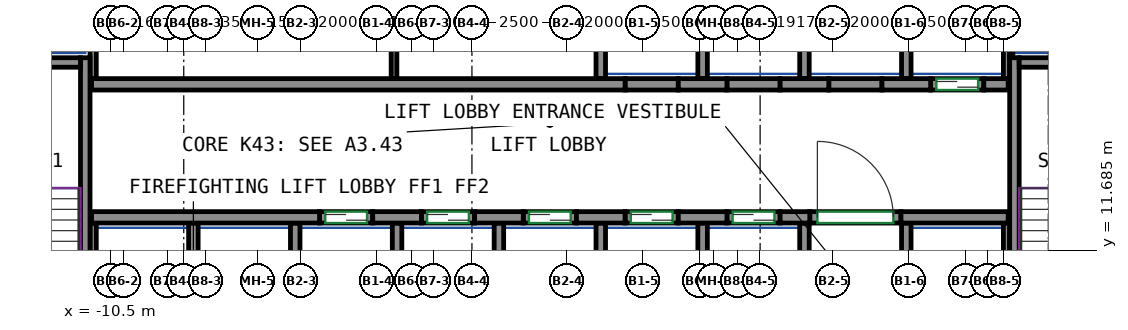
"""IFC4 building model, lengths in metres.
Left out: names, types, materials, properties, quantities, classifications, styles, units other than length and angle.
Written with IfcOpenShell. Run it as: python <this file> out.ifc"""

import sys

from ifc_helpers import new_model, si_unit, direction, frame, frame_2d, origin, place, context, subcontext, project, spatial, rectangle, extrude, source, transform, mapped, element, fill, save


model = new_model("IFC4")
c1 = context("Model", 3, precision=1e-05, world=origin(), true_north=direction((0.0, 1.0)))
c2 = subcontext(c1, "Body", "Model", "MODEL_VIEW")
j1 = project(units=[si_unit("LENGTHUNIT", "METRE"), si_unit("PLANEANGLEUNIT", "RADIAN")], contexts=[c1])
p1 = place(None, origin())
s1 = spatial("IfcSite", under=j1, at=p1, CompositionType="ELEMENT")
p2 = place(p1, origin())
s2 = spatial("IfcBuilding", under=s1, at=p2, CompositionType="ELEMENT")
p3 = place(p2, frame((0.0, 0.0, 178.7)))
s3 = spatial("IfcBuildingStorey", under=s2, at=p3, CompositionType="ELEMENT", Elevation=178.7)
m1 = source(origin(), c2, "Body", "SweptSolid", [
    extrude(rectangle(XDim=7.75, YDim=0.25, at=frame_2d((3.875, 0.0))), origin(), (0.0, 0.0, 1.0), 3.12),
])
p4 = place(p3, frame((-11.175, 9.0, 0.0), z_axis=(0.0, 0.0, 1.0), x_axis=(0.0, 1.0, 0.0)))
e1 = element("IfcWall", 1, at=p4, inside=s3, PredefinedType="SHEAR", context=c2, shape_type="MappedRepresentation", body=[
    mapped(m1, transform((0.0, 0.0, 0.0))),
])
m2 = source(origin(), c2, "Body", "SweptSolid", [
    extrude(rectangle(XDim=3.7, YDim=0.25, at=frame_2d((1.85, 0.0))), origin(), (0.0, 0.0, 1.0), 3.12),
])
p5 = place(p3, frame((-15.0, 16.625, 0.0), z_axis=(0.0, 0.0, 1.0), x_axis=(1.0, 0.0, 0.0)))
e2 = element("IfcWall", 2, at=p5, inside=s3, PredefinedType="SHEAR", context=c2, shape_type="MappedRepresentation", body=[
    mapped(m2, transform((0.0, 0.0, 0.0))),
])
p6 = place(p3, frame((13.275, 9.0, 0.0), z_axis=(0.0, 0.0, 1.0), x_axis=(0.0, 1.0, 0.0)))
e3 = element("IfcWall", 3, at=p6, inside=s3, PredefinedType="SHEAR", context=c2, shape_type="MappedRepresentation", body=[
    mapped(m1, transform((0.0, 0.0, 0.0))),
])
m3 = source(origin(), c2, "Body", "SweptSolid", [
    extrude(rectangle(XDim=3.7, YDim=0.25, at=frame_2d((1.85, 0.0))), origin(), (0.0, 0.0, 1.0), 3.12),
])
p7 = place(p3, frame((13.4, 16.625, 0.0), z_axis=(0.0, 0.0, 1.0), x_axis=(1.0, 0.0, 0.0)))
e4 = element("IfcWall", 4, at=p7, inside=s3, PredefinedType="SHEAR", context=c2, shape_type="MappedRepresentation", body=[
    mapped(m3, transform((0.0, 0.0, 0.0))),
])
m4 = source(origin(), c2, "Body", "SweptSolid", [
    extrude(rectangle(XDim=6.0, YDim=0.3, at=frame_2d((3.0, 0.0))), origin(), (0.0, 0.0, 1.0), 3.12),
])
p8 = place(p3, frame((-11.01, 12.55, 0.0), z_axis=(0.0, 0.0, 1.0), x_axis=(1.0, 0.0, 0.0)))
e5 = element("IfcWall", 5, at=p8, inside=s3, PredefinedType="SHEAR", context=c2, shape_type="MappedRepresentation", body=[
    mapped(m4, transform((0.0, 0.0, 0.0))),
])
m5 = source(origin(), c2, "Body", "SweptSolid", [
    extrude(rectangle(XDim=1.28, YDim=0.3, at=frame_2d((0.64, 0.0))), origin(), (0.0, 0.0, 1.0), 3.12),
])
for number, where, z_axis, x_axis in (
    (6, (-3.61, 12.55, 0.0), (0.0, 0.0, 1.0), (1.0, 0.0, 0.0)),
    (7, (-0.93, 12.55, 0.0), (0.0, 0.0, 1.0), (1.0, 0.0, 0.0)),
    (8, (1.75, 12.55, 0.0), (0.0, 0.0, 1.0), (1.0, 0.0, 0.0)),
    (9, (4.43, 12.55, 0.0), (0.0, 0.0, 1.0), (1.0, 0.0, 0.0)),
):
    element("IfcWall", number, at=place(p3, frame(where, z_axis=z_axis, x_axis=x_axis)), inside=s3, PredefinedType="SHEAR", context=c2, shape_type="MappedRepresentation", body=[
        mapped(m5, transform((0.0, 0.0, 0.0))),
    ])
m6 = source(origin(), c2, "Body", "SweptSolid", [
    extrude(rectangle(XDim=0.78, YDim=0.3, at=frame_2d((0.39, 0.0))), origin(), (0.0, 0.0, 1.0), 3.12),
])
p9 = place(p3, frame((7.11, 12.55, 0.0), z_axis=(0.0, 0.0, 1.0), x_axis=(1.0, 0.0, 0.0)))
e10 = element("IfcWall", 10, at=p9, inside=s3, PredefinedType="SHEAR", context=c2, shape_type="MappedRepresentation", body=[
    mapped(m6, transform((0.0, 0.0, 0.0))),
])
m7 = source(origin(), c2, "Body", "SweptSolid", [
    extrude(rectangle(XDim=2.82, YDim=0.3, at=frame_2d((1.41, 0.0))), origin(), (0.0, 0.0, 1.0), 3.12),
])
p10 = place(p3, frame((10.29, 12.55, 0.0), z_axis=(0.0, 0.0, 1.0), x_axis=(1.0, 0.0, 0.0)))
e11 = element("IfcWall", 11, at=p10, inside=s3, PredefinedType="SHEAR", context=c2, shape_type="MappedRepresentation", body=[
    mapped(m7, transform((0.0, 0.0, 0.0))),
])
m8 = source(origin(), c2, "Body", "SweptSolid", [
    extrude(rectangle(XDim=14.04, YDim=0.3, at=frame_2d((7.02, 0.0))), origin(), (0.0, 0.0, 1.0), 3.12),
])
p11 = place(p3, frame((-11.01, 16.05, 0.0), z_axis=(0.0, 0.0, 1.0), x_axis=(1.0, 0.0, 0.0)))
e12 = element("IfcWall", 12, at=p11, inside=s3, PredefinedType="SHEAR", context=c2, shape_type="MappedRepresentation", body=[
    mapped(m8, transform((0.0, 0.0, 0.0))),
])
p12 = place(p3, frame((4.43, 16.05, 0.0), z_axis=(0.0, 0.0, 1.0), x_axis=(1.0, 0.0, 0.0)))
e13 = element("IfcWall", 13, at=p12, inside=s3, PredefinedType="SHEAR", context=c2, shape_type="MappedRepresentation", body=[
    mapped(m5, transform((0.0, 0.0, 0.0))),
])
m9 = source(origin(), c2, "Body", "SweptSolid", [
    extrude(rectangle(XDim=1.28, YDim=0.3, at=frame_2d((0.64, 0.0))), origin(), (0.0, 0.0, 1.0), 3.12),
])
p13 = place(p3, frame((7.11, 16.05, 0.0), z_axis=(0.0, 0.0, 1.0), x_axis=(1.0, 0.0, 0.0)))
e14 = element("IfcWall", 14, at=p13, inside=s3, PredefinedType="SHEAR", context=c2, shape_type="MappedRepresentation", body=[
    mapped(m9, transform((0.0, 0.0, 0.0))),
])
p14 = place(p3, frame((9.79, 16.05, 0.0), z_axis=(0.0, 0.0, 1.0), x_axis=(1.0, 0.0, 0.0)))
e15 = element("IfcWall", 15, at=p14, inside=s3, PredefinedType="SHEAR", context=c2, shape_type="MappedRepresentation", body=[
    mapped(m5, transform((0.0, 0.0, 0.0))),
])
m10 = source(origin(), c2, "Body", "SweptSolid", [
    extrude(rectangle(XDim=0.64, YDim=0.3, at=frame_2d((0.32, 0.0))), origin(), (0.0, 0.0, 1.0), 3.12),
])
p15 = place(p3, frame((12.47, 16.05, 0.0), z_axis=(0.0, 0.0, 1.0), x_axis=(1.0, 0.0, 0.0)))
e16 = element("IfcWall", 16, at=p15, inside=s3, PredefinedType="SHEAR", context=c2, shape_type="MappedRepresentation", body=[
    mapped(m10, transform((0.0, 0.0, 0.0))),
])
m11 = source(origin(), c2, "Body", "SweptSolid", [
    extrude(rectangle(XDim=1.4, YDim=0.3, at=frame_2d((0.7, 0.0))), origin(), (0.0, 0.0, 1.0), 3.12),
])
p16 = place(p3, frame((-5.01, 12.55, 0.0), z_axis=(0.0, 0.0, 1.0), x_axis=(1.0, 0.0, 0.0)))
e17 = element("IfcWall", 17, at=p16, inside=s3, PredefinedType="PARTITIONING", context=c2, shape_type="MappedRepresentation", body=[
    mapped(m11, transform((0.0, 0.0, 0.0))),
])
p17 = place(p16, frame((0.15, 0.0, 0.0)))
e18 = element("IfcOpeningElement", 18, at=p17, cuts=e17, PredefinedType="OPENING", context=c2, shape_type="SweptSolid", body=[
    extrude(rectangle(XDim=1.1, YDim=2.1, at=frame_2d((0.55, 1.05))), frame((0.0, 0.16, 0.0), z_axis=(0.0, -1.0, 0.0), x_axis=(1.0, 0.0, 0.0)), (0.0, 0.0, 1.0), 0.32),
])
m12 = source(origin(), c2, "Body", "SweptSolid", [
    extrude(rectangle(XDim=1.4, YDim=0.3, at=frame_2d((0.7, 0.0))), origin(), (0.0, 0.0, 1.0), 3.12),
])
p18 = place(p3, frame((-2.33, 12.55, 0.0), z_axis=(0.0, 0.0, 1.0), x_axis=(1.0, 0.0, 0.0)))
e19 = element("IfcWall", 19, at=p18, inside=s3, PredefinedType="PARTITIONING", context=c2, shape_type="MappedRepresentation", body=[
    mapped(m12, transform((0.0, 0.0, 0.0))),
])
p19 = place(p18, frame((0.15, 0.0, 0.0)))
e20 = element("IfcOpeningElement", 20, at=p19, cuts=e19, PredefinedType="OPENING", context=c2, shape_type="SweptSolid", body=[
    extrude(rectangle(XDim=1.1, YDim=2.1, at=frame_2d((0.55, 1.05))), frame((0.0, 0.16, 0.0), z_axis=(0.0, -1.0, 0.0), x_axis=(1.0, 0.0, 0.0)), (0.0, 0.0, 1.0), 0.32),
])
p20 = place(p3, frame((0.35, 12.55, 0.0), z_axis=(0.0, 0.0, 1.0), x_axis=(1.0, 0.0, 0.0)))
e21 = element("IfcWall", 21, at=p20, inside=s3, PredefinedType="PARTITIONING", context=c2, shape_type="MappedRepresentation", body=[
    mapped(m11, transform((0.0, 0.0, 0.0))),
])
p21 = place(p20, frame((0.15, 0.0, 0.0)))
e22 = element("IfcOpeningElement", 22, at=p21, cuts=e21, PredefinedType="OPENING", context=c2, shape_type="SweptSolid", body=[
    extrude(rectangle(XDim=1.1, YDim=2.1, at=frame_2d((0.55, 1.05))), frame((0.0, 0.16, 0.0), z_axis=(0.0, -1.0, 0.0), x_axis=(1.0, 0.0, 0.0)), (0.0, 0.0, 1.0), 0.32),
])
p22 = place(p3, frame((3.03, 12.55, 0.0), z_axis=(0.0, 0.0, 1.0), x_axis=(1.0, 0.0, 0.0)))
e23 = element("IfcWall", 23, at=p22, inside=s3, PredefinedType="PARTITIONING", context=c2, shape_type="MappedRepresentation", body=[
    mapped(m11, transform((0.0, 0.0, 0.0))),
])
p23 = place(p22, frame((0.15, 0.0, 0.0)))
e24 = element("IfcOpeningElement", 24, at=p23, cuts=e23, PredefinedType="OPENING", context=c2, shape_type="SweptSolid", body=[
    extrude(rectangle(XDim=1.1, YDim=2.1, at=frame_2d((0.55, 1.05))), frame((0.0, 0.16, 0.0), z_axis=(0.0, -1.0, 0.0), x_axis=(1.0, 0.0, 0.0)), (0.0, 0.0, 1.0), 0.32),
])
p24 = place(p3, frame((5.71, 12.55, 0.0), z_axis=(0.0, 0.0, 1.0), x_axis=(1.0, 0.0, 0.0)))
e25 = element("IfcWall", 25, at=p24, inside=s3, PredefinedType="PARTITIONING", context=c2, shape_type="MappedRepresentation", body=[
    mapped(m12, transform((0.0, 0.0, 0.0))),
])
p25 = place(p24, frame((0.15, 0.0, 0.0)))
e26 = element("IfcOpeningElement", 26, at=p25, cuts=e25, PredefinedType="OPENING", context=c2, shape_type="SweptSolid", body=[
    extrude(rectangle(XDim=1.1, YDim=2.1, at=frame_2d((0.55, 1.05))), frame((0.0, 0.16, 0.0), z_axis=(0.0, -1.0, 0.0), x_axis=(1.0, 0.0, 0.0)), (0.0, 0.0, 1.0), 0.32),
])
p26 = place(p3, frame((11.07, 16.05, 0.0), z_axis=(0.0, 0.0, 1.0), x_axis=(1.0, 0.0, 0.0)))
e27 = element("IfcWall", 27, at=p26, inside=s3, PredefinedType="PARTITIONING", context=c2, shape_type="MappedRepresentation", body=[
    mapped(m11, transform((0.0, 0.0, 0.0))),
])
p27 = place(p26, frame((0.15, 0.0, 0.0)))
e28 = element("IfcOpeningElement", 28, at=p27, cuts=e27, PredefinedType="OPENING", context=c2, shape_type="SweptSolid", body=[
    extrude(rectangle(XDim=1.1, YDim=2.1, at=frame_2d((0.55, 1.05))), frame((0.0, 0.16, 0.0), z_axis=(0.0, -1.0, 0.0), x_axis=(1.0, 0.0, 0.0)), (0.0, 0.0, 1.0), 0.32),
])
m13 = source(origin(), c2, "Body", "SweptSolid", [
    extrude(rectangle(XDim=2.4, YDim=0.3, at=frame_2d((1.2, 0.0))), origin(), (0.0, 0.0, 1.0), 3.12),
])
p28 = place(p3, frame((7.89, 12.55, 0.0), z_axis=(0.0, 0.0, 1.0), x_axis=(1.0, 0.0, 0.0)))
e29 = element("IfcWall", 29, at=p28, inside=s3, PredefinedType="PARTITIONING", context=c2, shape_type="MappedRepresentation", body=[
    mapped(m13, transform((0.0, 0.0, 0.0))),
])
p29 = place(p28, frame((0.2, 0.0, 0.0)))
e30 = element("IfcOpeningElement", 30, at=p29, cuts=e29, PredefinedType="OPENING", context=c2, shape_type="SweptSolid", body=[
    extrude(rectangle(XDim=2.0, YDim=2.1, at=frame_2d((1.0, 1.05))), frame((0.0, 0.16, 0.0), z_axis=(0.0, -1.0, 0.0), x_axis=(1.0, 0.0, 0.0)), (0.0, 0.0, 1.0), 0.32),
])
p30 = place(p3, frame((3.03, 16.05, 0.0), z_axis=(0.0, 0.0, 1.0), x_axis=(1.0, 0.0, 0.0)))
e31 = element("IfcWall", 31, at=p30, inside=s3, PredefinedType="PARTITIONING", context=c2, shape_type="MappedRepresentation", body=[
    mapped(m11, transform((0.0, 0.0, 0.0))),
])
for number, where, z_axis, x_axis in (
    (32, (5.71, 16.05, 0.0), (0.0, 0.0, 1.0), (1.0, 0.0, 0.0)),
    (33, (8.39, 16.05, 0.0), (0.0, 0.0, 1.0), (1.0, 0.0, 0.0)),
):
    element("IfcWall", number, at=place(p3, frame(where, z_axis=z_axis, x_axis=x_axis)), inside=s3, PredefinedType="PARTITIONING", context=c2, shape_type="MappedRepresentation", body=[
        mapped(m12, transform((0.0, 0.0, 0.0))),
    ])
m14 = source(origin(), c2, "Body", "SweptSolid", [
    extrude(rectangle(XDim=3.275, YDim=0.165, at=frame_2d((1.638, 0.0))), origin(), (0.0, 0.0, 1.0), 3.12),
])
p31 = place(p3, frame((13.067, 16.2, 0.0), z_axis=(0.0, 0.0, 1.0), x_axis=(0.0, 1.0, 0.0)))
e34 = element("IfcWall", 34, at=p31, inside=s3, PredefinedType="PARTITIONING", context=c2, shape_type="MappedRepresentation", body=[
    mapped(m14, transform((0.0, 0.0, 0.0))),
])
m15 = source(origin(), c2, "Body", "SweptSolid", [
    extrude(rectangle(XDim=4.8, YDim=0.165, at=frame_2d((2.4, 0.0))), origin(), (0.0, 0.0, 1.0), 3.12),
])
p32 = place(p3, frame((-10.968, 16.2, 0.0), z_axis=(0.0, 0.0, 1.0), x_axis=(0.0, 1.0, 0.0)))
e35 = element("IfcWall", 35, at=p32, inside=s3, PredefinedType="PARTITIONING", context=c2, shape_type="MappedRepresentation", body=[
    mapped(m15, transform((0.0, 0.0, 0.0))),
])
m16 = source(origin(), c2, "Body", "SweptSolid", [
    extrude(rectangle(XDim=3.275, YDim=0.25, at=frame_2d((1.638, 0.0))), origin(), (0.0, 0.0, 1.0), 3.12),
])
p33 = place(p3, frame((10.43, 16.2, 0.0), z_axis=(0.0, 0.0, 1.0), x_axis=(0.0, 1.0, 0.0)))
e36 = element("IfcWall", 36, at=p33, inside=s3, PredefinedType="PARTITIONING", context=c2, shape_type="MappedRepresentation", body=[
    mapped(m16, transform((0.0, 0.0, 0.0))),
])
m17 = source(origin(), c2, "Body", "SweptSolid", [
    extrude(rectangle(XDim=2.725, YDim=0.085, at=frame_2d((1.363, 0.0))), origin(), (0.0, 0.0, 1.0), 3.12),
])
p34 = place(p3, frame((13.192, 16.75, 0.0), z_axis=(0.0, 0.0, 1.0), x_axis=(0.0, 1.0, 0.0)))
e37 = element("IfcWall", 37, at=p34, inside=s3, PredefinedType="PARTITIONING", context=c2, shape_type="MappedRepresentation", body=[
    mapped(m17, transform((0.0, 0.0, 0.0))),
])
for number, where, z_axis, x_axis in (
    (38, (2.39, 16.2, 0.0), (0.0, 0.0, 1.0), (0.0, 1.0, 0.0)),
    (39, (5.07, 16.2, 0.0), (0.0, 0.0, 1.0), (0.0, 1.0, 0.0)),
    (40, (7.75, 16.2, 0.0), (0.0, 0.0, 1.0), (0.0, 1.0, 0.0)),
):
    element("IfcWall", number, at=place(p3, frame(where, z_axis=z_axis, x_axis=x_axis)), inside=s3, PredefinedType="PARTITIONING", context=c2, shape_type="MappedRepresentation", body=[
        mapped(m16, transform((0.0, 0.0, 0.0))),
    ])
m18 = source(origin(), c2, "Body", "SweptSolid", [
    extrude(rectangle(XDim=3.4, YDim=0.25, at=frame_2d((1.7, 0.0))), origin(), (0.0, 0.0, 1.0), 3.12),
])
p35 = place(p3, frame((10.43, 9.0, 0.0), z_axis=(0.0, 0.0, 1.0), x_axis=(0.0, 1.0, 0.0)))
e41 = element("IfcWall", 41, at=p35, inside=s3, PredefinedType="PARTITIONING", context=c2, shape_type="MappedRepresentation", body=[
    mapped(m18, transform((0.0, 0.0, 0.0))),
])
m19 = source(origin(), c2, "Body", "SweptSolid", [
    extrude(rectangle(XDim=3.4, YDim=0.165, at=frame_2d((1.7, 0.0))), origin(), (0.0, 0.0, 1.0), 3.12),
])
p36 = place(p3, frame((13.067, 9.0, 0.0), z_axis=(0.0, 0.0, 1.0), x_axis=(0.0, 1.0, 0.0)))
e42 = element("IfcWall", 42, at=p36, inside=s3, PredefinedType="PARTITIONING", context=c2, shape_type="MappedRepresentation", body=[
    mapped(m19, transform((0.0, 0.0, 0.0))),
])
for number, where, z_axis, x_axis in (
    (43, (2.39, 9.0, 0.0), (0.0, 0.0, 1.0), (0.0, 1.0, 0.0)),
    (44, (5.07, 9.0, 0.0), (0.0, 0.0, 1.0), (0.0, 1.0, 0.0)),
    (45, (7.75, 9.0, 0.0), (0.0, 0.0, 1.0), (0.0, 1.0, 0.0)),
    (46, (-0.29, 9.0, 0.0), (0.0, 0.0, 1.0), (0.0, 1.0, 0.0)),
):
    element("IfcWall", number, at=place(p3, frame(where, z_axis=z_axis, x_axis=x_axis)), inside=s3, PredefinedType="PARTITIONING", context=c2, shape_type="MappedRepresentation", body=[
        mapped(m18, transform((0.0, 0.0, 0.0))),
    ])
p37 = place(p3, frame((-10.968, 9.0, 0.0), z_axis=(0.0, 0.0, 1.0), x_axis=(0.0, 1.0, 0.0)))
e47 = element("IfcWall", 47, at=p37, inside=s3, PredefinedType="PARTITIONING", context=c2, shape_type="MappedRepresentation", body=[
    mapped(m19, transform((0.0, 0.0, 0.0))),
])
for number, where, z_axis, x_axis in (
    (48, (-2.97, 9.0, 0.0), (0.0, 0.0, 1.0), (0.0, 1.0, 0.0)),
    (49, (-5.65, 9.0, 0.0), (0.0, 0.0, 1.0), (0.0, 1.0, 0.0)),
    (50, (-8.33, 9.0, 0.0), (0.0, 0.0, 1.0), (0.0, 1.0, 0.0)),
):
    element("IfcWall", number, at=place(p3, frame(where, z_axis=z_axis, x_axis=x_axis)), inside=s3, PredefinedType="PARTITIONING", context=c2, shape_type="MappedRepresentation", body=[
        mapped(m18, transform((0.0, 0.0, 0.0))),
    ])
m20 = source(origin(), c2, "Body", "SweptSolid", [
    extrude(rectangle(XDim=4.8, YDim=0.15, at=frame_2d((2.4, 0.0))), origin(), (0.0, 0.0, 1.0), 3.12),
])
p38 = place(p3, frame((-3.05, 16.2, 0.0), z_axis=(0.0, 0.0, 1.0), x_axis=(0.0, 1.0, 0.0)))
e51 = element("IfcWall", 51, at=p38, inside=s3, PredefinedType="PARTITIONING", context=c2, shape_type="MappedRepresentation", body=[
    mapped(m20, transform((0.0, 0.0, 0.0))),
])
p39 = place(p29, origin())
e52 = element("IfcDoor", 52, at=p39, inside=s3, OperationType="DOUBLE_DOOR_SINGLE_SWING", PredefinedType="DOOR", context=c2, shape_type="SweptSolid", body=[
    extrude(rectangle(XDim=2.0, YDim=2.1, at=frame_2d((1.0, 1.05))), frame((0.0, 0.025, 0.0), z_axis=(0.0, -1.0, 0.0), x_axis=(1.0, 0.0, 0.0)), (0.0, 0.0, 1.0), 0.05),
])
fill(e30, e52)
p40 = place(p17, origin())
e53 = element("IfcDoor", 53, at=p40, inside=s3, OperationType="DOUBLE_DOOR_SLIDING", PredefinedType="DOOR", context=c2, shape_type="SweptSolid", body=[
    extrude(rectangle(XDim=1.1, YDim=2.1, at=frame_2d((0.55, 1.05))), frame((0.0, 0.025, 0.0), z_axis=(0.0, -1.0, 0.0), x_axis=(1.0, 0.0, 0.0)), (0.0, 0.0, 1.0), 0.05),
])
fill(e18, e53)
p41 = place(p19, origin())
e54 = element("IfcDoor", 54, at=p41, inside=s3, OperationType="DOUBLE_DOOR_SLIDING", PredefinedType="DOOR", context=c2, shape_type="SweptSolid", body=[
    extrude(rectangle(XDim=1.1, YDim=2.1, at=frame_2d((0.55, 1.05))), frame((0.0, 0.025, 0.0), z_axis=(0.0, -1.0, 0.0), x_axis=(1.0, 0.0, 0.0)), (0.0, 0.0, 1.0), 0.05),
])
fill(e20, e54)
p42 = place(p21, origin())
e55 = element("IfcDoor", 55, at=p42, inside=s3, OperationType="DOUBLE_DOOR_SLIDING", PredefinedType="DOOR", context=c2, shape_type="SweptSolid", body=[
    extrude(rectangle(XDim=1.1, YDim=2.1, at=frame_2d((0.55, 1.05))), frame((0.0, 0.025, 0.0), z_axis=(0.0, -1.0, 0.0), x_axis=(1.0, 0.0, 0.0)), (0.0, 0.0, 1.0), 0.05),
])
fill(e22, e55)
p43 = place(p23, origin())
e56 = element("IfcDoor", 56, at=p43, inside=s3, OperationType="DOUBLE_DOOR_SLIDING", PredefinedType="DOOR", context=c2, shape_type="SweptSolid", body=[
    extrude(rectangle(XDim=1.1, YDim=2.1, at=frame_2d((0.55, 1.05))), frame((0.0, 0.025, 0.0), z_axis=(0.0, -1.0, 0.0), x_axis=(1.0, 0.0, 0.0)), (0.0, 0.0, 1.0), 0.05),
])
fill(e24, e56)
p44 = place(p25, origin())
e57 = element("IfcDoor", 57, at=p44, inside=s3, OperationType="DOUBLE_DOOR_SLIDING", PredefinedType="DOOR", context=c2, shape_type="SweptSolid", body=[
    extrude(rectangle(XDim=1.1, YDim=2.1, at=frame_2d((0.55, 1.05))), frame((0.0, 0.025, 0.0), z_axis=(0.0, -1.0, 0.0), x_axis=(1.0, 0.0, 0.0)), (0.0, 0.0, 1.0), 0.05),
])
fill(e26, e57)
p45 = place(p27, origin())
e58 = element("IfcDoor", 58, at=p45, inside=s3, OperationType="DOUBLE_DOOR_SLIDING", PredefinedType="DOOR", context=c2, shape_type="SweptSolid", body=[
    extrude(rectangle(XDim=1.1, YDim=2.1, at=frame_2d((0.55, 1.05))), frame((0.0, 0.025, 0.0), z_axis=(0.0, -1.0, 0.0), x_axis=(1.0, 0.0, 0.0)), (0.0, 0.0, 1.0), 0.05),
])
fill(e28, e58)
save(model, sys.argv[1])
